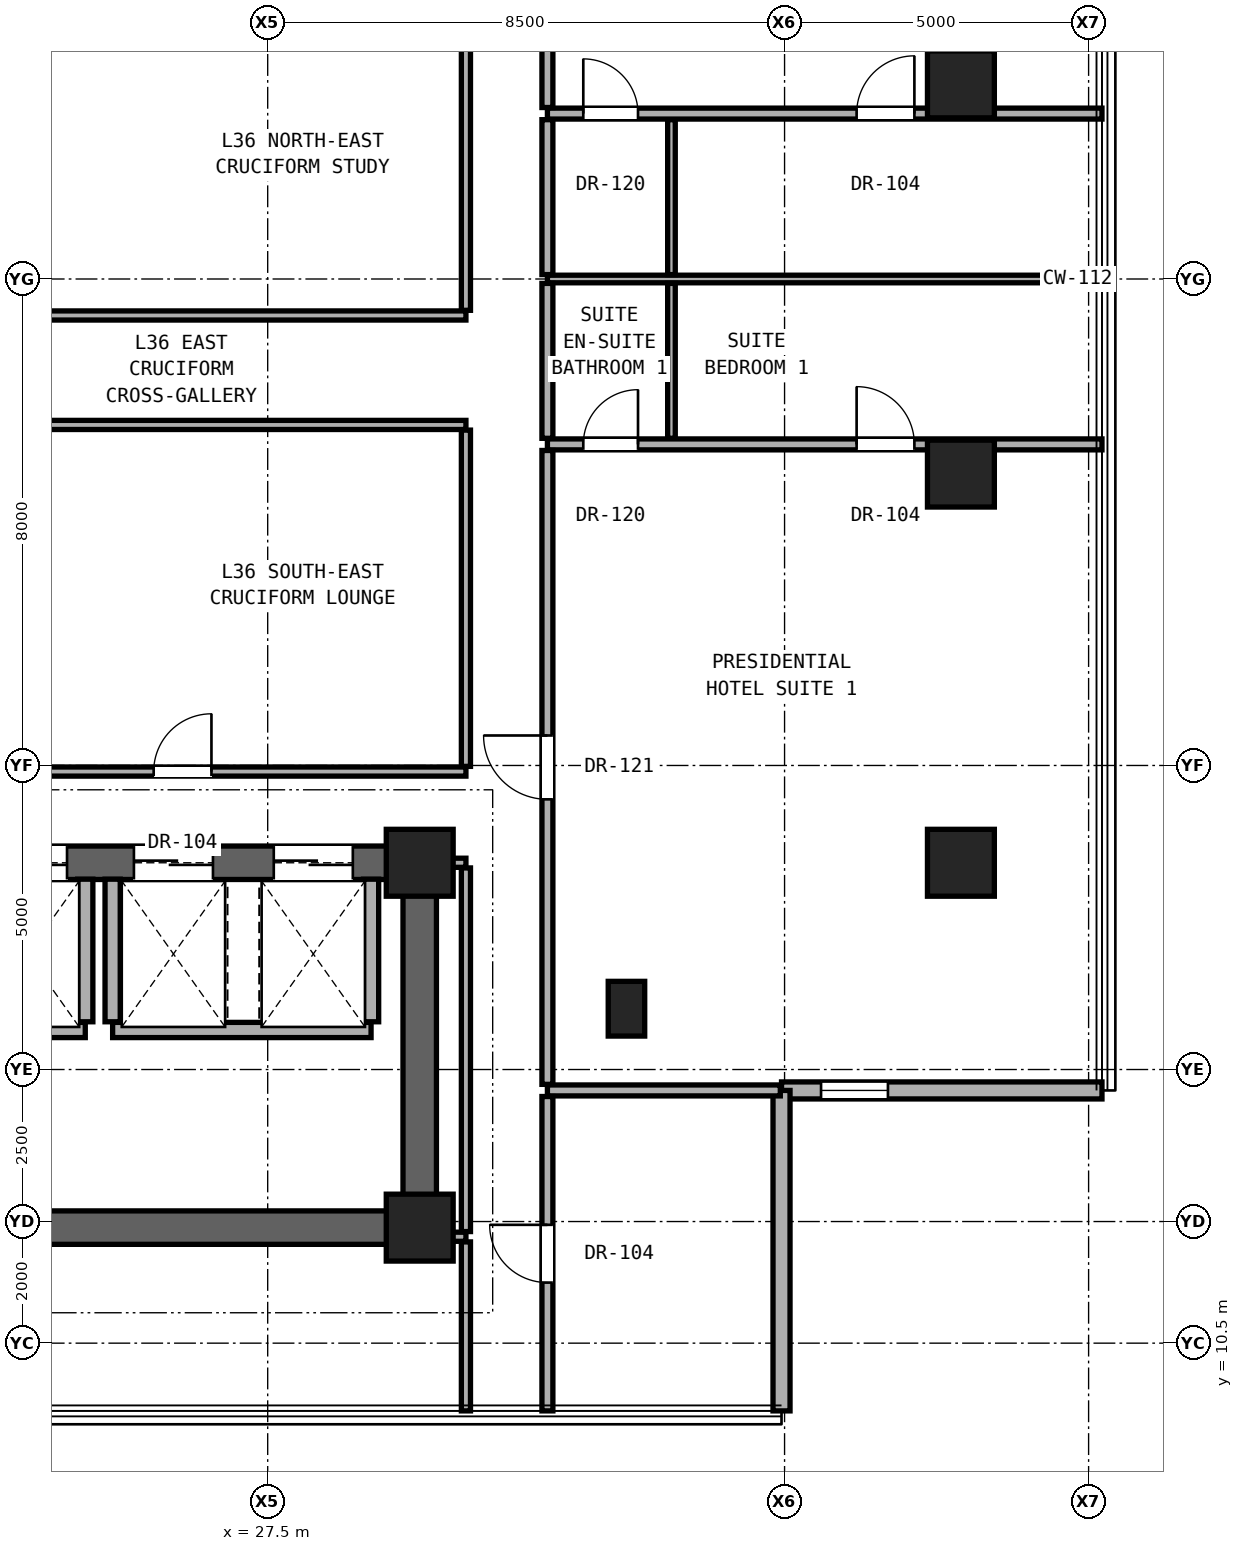
"""IFC4 building model, lengths in metres.
Left out: names, types, materials, properties, quantities, classifications, styles, units other than length and angle.
Written with IfcOpenShell. Run it as: python <this file> out.ifc"""

import sys

from ifc_helpers import new_model, si_unit, direction, frame, frame_2d, origin, origin_2d, place, context, subcontext, project, spatial, rectangle, hollow_rectangle, extrude, element, fill, save


model = new_model("IFC4")
c1 = context("Model", 3, precision=1e-05, world=origin(), true_north=direction((0.0, 1.0)))
c2 = subcontext(c1, "Body", "Model", "MODEL_VIEW")
j1 = project(units=[si_unit("LENGTHUNIT", "METRE"), si_unit("PLANEANGLEUNIT", "RADIAN")], contexts=[c1])
p1 = place(None, origin())
s1 = spatial("IfcSite", under=j1, at=p1, CompositionType="ELEMENT")
p2 = place(p1, origin())
s2 = spatial("IfcBuilding", under=s1, at=p2, CompositionType="ELEMENT")
p3 = place(p2, frame((0.0, 0.0, 128.0)))
s3 = spatial("IfcBuildingStorey", under=s2, at=p3, CompositionType="ELEMENT", Elevation=128.0)
for number, where, z_axis, x_axis in (
    (1, (30.0, 12.4, 0.0), (0.0, 0.0, 1.0), (1.0, 0.0, 0.0)),
    (2, (30.0, 18.4, 0.0), (0.0, 0.0, 1.0), (1.0, 0.0, 0.0)),
):
    element("IfcColumn", number, at=place(p3, frame(where, z_axis=z_axis, x_axis=x_axis)), inside=s3, PredefinedType="COLUMN", context=c2, shape_type="SweptSolid", body=[
        extrude(rectangle(XDim=1.1, YDim=1.1, at=origin_2d()), origin(), (0.0, 0.0, 1.0), 3.3),
    ])
for number, where, z_axis, x_axis in (
    (3, (38.9, 18.4, 0.0), (0.0, 0.0, 1.0), (1.0, 0.0, 0.0)),
    (4, (38.9, 24.8, 0.0), (0.0, 0.0, 1.0), (1.0, 0.0, 0.0)),
    (5, (38.9, 31.2, 0.0), (0.0, 0.0, 1.0), (1.0, 0.0, 0.0)),
):
    element("IfcColumn", number, at=place(p3, frame(where, z_axis=z_axis, x_axis=x_axis)), inside=s3, PredefinedType="COLUMN", context=c2, shape_type="SweptSolid", body=[
        extrude(hollow_rectangle(XDim=1.1, YDim=1.1, WallThickness=0.06, at=origin_2d()), origin(), (0.0, 0.0, 1.0), 3.3),
    ])
p4 = place(p3, frame((33.4, 16.0, 0.0), z_axis=(0.0, 0.0, 1.0), x_axis=(1.0, 0.0, 0.0)))
e6 = element("IfcColumn", 6, at=p4, inside=s3, PredefinedType="PILASTER", context=c2, shape_type="SweptSolid", body=[
    extrude(rectangle(XDim=0.6, YDim=0.9, at=origin_2d()), origin(), (0.0, 0.0, 1.0), 3.3),
])
p5 = place(p3, frame((11.0, 12.4, 0.0), z_axis=(0.0, 0.0, 1.0), x_axis=(1.0, 0.0, 0.0)))
e7 = element("IfcWall", 7, at=p5, inside=s3, PredefinedType="SHEAR", context=c2, shape_type="SweptSolid", body=[
    extrude(rectangle(XDim=19.0, YDim=0.55, at=frame_2d((9.5, 0.0))), origin(), (0.0, 0.0, 1.0), 3.08),
])
p6 = place(p3, frame((30.0, 12.4, 0.0), z_axis=(0.0, 0.0, 1.0), x_axis=(0.0, 1.0, 0.0)))
e8 = element("IfcWall", 8, at=p6, inside=s3, PredefinedType="SHEAR", context=c2, shape_type="SweptSolid", body=[
    extrude(rectangle(XDim=6.0, YDim=0.55, at=frame_2d((3.0, 0.0))), origin(), (0.0, 0.0, 1.0), 3.08),
])
p7 = place(p3, frame((11.0, 18.4, 0.0), z_axis=(0.0, 0.0, 1.0), x_axis=(1.0, 0.0, 0.0)))
e9 = element("IfcWall", 9, at=p7, inside=s3, PredefinedType="SHEAR", context=c2, shape_type="SweptSolid", body=[
    extrude(rectangle(XDim=19.0, YDim=0.55, at=frame_2d((9.5, 0.0))), origin(), (0.0, 0.0, 1.0), 3.08),
])
p8 = place(p7, frame((4.175, 0.0, 0.0)))
e10 = element("IfcOpeningElement", 10, at=p8, cuts=e9, PredefinedType="OPENING", context=c2, shape_type="SweptSolid", body=[
    extrude(rectangle(XDim=1.2, YDim=2.25, at=frame_2d((0.6, 1.125))), frame((0.0, 0.285, 0.0), z_axis=(0.0, -1.0, 0.0), x_axis=(1.0, 0.0, 0.0)), (0.0, 0.0, 1.0), 0.57),
])
p9 = place(p7, frame((9.6, 0.0, 0.0)))
e11 = element("IfcOpeningElement", 11, at=p9, cuts=e9, PredefinedType="OPENING", context=c2, shape_type="SweptSolid", body=[
    extrude(rectangle(XDim=1.3, YDim=2.3, at=frame_2d((0.65, 1.15))), frame((0.0, 0.285, 0.0), z_axis=(0.0, -1.0, 0.0), x_axis=(1.0, 0.0, 0.0)), (0.0, 0.0, 1.0), 0.57),
])
p10 = place(p7, frame((11.9, 0.0, 0.0)))
e12 = element("IfcOpeningElement", 12, at=p10, cuts=e9, PredefinedType="OPENING", context=c2, shape_type="SweptSolid", body=[
    extrude(rectangle(XDim=1.3, YDim=2.3, at=frame_2d((0.65, 1.15))), frame((0.0, 0.285, 0.0), z_axis=(0.0, -1.0, 0.0), x_axis=(1.0, 0.0, 0.0)), (0.0, 0.0, 1.0), 0.57),
])
p11 = place(p7, frame((14.3, 0.0, 0.0)))
e13 = element("IfcOpeningElement", 13, at=p11, cuts=e9, PredefinedType="OPENING", context=c2, shape_type="SweptSolid", body=[
    extrude(rectangle(XDim=1.3, YDim=2.3, at=frame_2d((0.65, 1.15))), frame((0.0, 0.285, 0.0), z_axis=(0.0, -1.0, 0.0), x_axis=(1.0, 0.0, 0.0)), (0.0, 0.0, 1.0), 0.57),
])
p12 = place(p7, frame((16.6, 0.0, 0.0)))
e14 = element("IfcOpeningElement", 14, at=p12, cuts=e9, PredefinedType="OPENING", context=c2, shape_type="SweptSolid", body=[
    extrude(rectangle(XDim=1.3, YDim=2.3, at=frame_2d((0.65, 1.15))), frame((0.0, 0.285, 0.0), z_axis=(0.0, -1.0, 0.0), x_axis=(1.0, 0.0, 0.0)), (0.0, 0.0, 1.0), 0.57),
])
p13 = place(p3, frame((35.95, 14.656, 0.0), z_axis=(0.0, 0.0, 1.0), x_axis=(1.0, 0.0, 0.0)))
e15 = element("IfcWall", 15, at=p13, inside=s3, PredefinedType="SOLIDWALL", context=c2, shape_type="SweptSolid", body=[
    extrude(rectangle(XDim=5.27, YDim=0.28, at=frame_2d((2.635, 0.0))), origin(), (0.0, 0.0, 1.0), 3.06),
])
p14 = place(p13, frame((0.65, 0.0, 0.85)))
e16 = element("IfcOpeningElement", 16, at=p14, cuts=e15, PredefinedType="OPENING", context=c2, shape_type="SweptSolid", body=[
    extrude(rectangle(XDim=1.1, YDim=2.0, at=frame_2d((0.55, 1.0))), frame((0.0, 0.15, 0.0), z_axis=(0.0, -1.0, 0.0), x_axis=(1.0, 0.0, 0.0)), (0.0, 0.0, 1.0), 0.3),
])
p15 = place(p3, frame((35.95, 9.386, 0.0), z_axis=(0.0, 0.0, 1.0), x_axis=(0.0, 1.0, 0.0)))
e17 = element("IfcWall", 17, at=p15, inside=s3, PredefinedType="SOLIDWALL", context=c2, shape_type="SweptSolid", body=[
    extrude(rectangle(XDim=5.27, YDim=0.28, at=frame_2d((2.635, 0.0))), origin(), (0.0, 0.0, 1.0), 3.06),
])
p16 = place(p3, frame((30.27, 12.25, 0.0), z_axis=(0.0, 0.0, 1.0), x_axis=(1.0, 0.0, 0.0)))
e18 = element("IfcWall", 18, at=p16, inside=s3, PredefinedType="PARTITIONING", context=c2, shape_type="SweptSolid", body=[
    extrude(rectangle(XDim=0.49, YDim=0.15, at=frame_2d((0.245, 0.0))), origin(), (0.0, 0.0, 1.0), 3.08),
])
p17 = place(p3, frame((32.1, 14.656, 0.0), z_axis=(0.0, 0.0, 1.0), x_axis=(1.0, 0.0, 0.0)))
e19 = element("IfcWall", 19, at=p17, inside=s3, PredefinedType="PARTITIONING", context=c2, shape_type="SweptSolid", body=[
    extrude(rectangle(XDim=3.83, YDim=0.18, at=frame_2d((1.915, 0.0))), origin(), (0.0, 0.0, 1.0), 3.08),
])
p18 = place(p3, frame((20.35, 15.65, 0.0), z_axis=(0.0, 0.0, 1.0), x_axis=(1.0, 0.0, 0.0)))
e20 = element("IfcWall", 20, at=p18, inside=s3, PredefinedType="SOLIDWALL", context=c2, shape_type="SweptSolid", body=[
    extrude(rectangle(XDim=4.15, YDim=0.25, at=frame_2d((2.075, 0.0))), origin(), (0.0, 0.0, 1.0), 3.08),
])
p19 = place(p3, frame((24.95, 15.65, 0.0), z_axis=(0.0, 0.0, 1.0), x_axis=(1.0, 0.0, 0.0)))
e21 = element("IfcWall", 21, at=p19, inside=s3, PredefinedType="SOLIDWALL", context=c2, shape_type="SweptSolid", body=[
    extrude(rectangle(XDim=4.25, YDim=0.25, at=frame_2d((2.125, 0.0))), origin(), (0.0, 0.0, 1.0), 3.08),
])
p20 = place(p3, frame((30.27, 18.4, 0.0), z_axis=(0.0, 0.0, 1.0), x_axis=(1.0, 0.0, 0.0)))
e22 = element("IfcWall", 22, at=p20, inside=s3, PredefinedType="PARTITIONING", context=c2, shape_type="SweptSolid", body=[
    extrude(rectangle(XDim=0.49, YDim=0.15, at=frame_2d((0.245, 0.0))), origin(), (0.0, 0.0, 1.0), 2.456),
])
p21 = place(p3, frame((21.44, 19.9, 0.0), z_axis=(0.0, 0.0, 1.0), x_axis=(1.0, 0.0, 0.0)))
e23 = element("IfcWall", 23, at=p21, inside=s3, PredefinedType="PARTITIONING", context=c2, shape_type="SweptSolid", body=[
    extrude(rectangle(XDim=9.32, YDim=0.15, at=frame_2d((4.66, 0.0))), origin(), (0.0, 0.0, 1.0), 2.216),
])
p22 = place(p21, frame((4.185, 0.0, 0.0)))
e24 = element("IfcOpeningElement", 24, at=p22, cuts=e23, PredefinedType="OPENING", context=c2, shape_type="SweptSolid", body=[
    extrude(rectangle(XDim=0.95, YDim=2.15, at=frame_2d((0.475, 1.075))), frame((0.0, 0.085, 0.0), z_axis=(0.0, -1.0, 0.0), x_axis=(1.0, 0.0, 0.0)), (0.0, 0.0, 1.0), 0.17),
])
p23 = place(p3, frame((32.1, 25.28, 0.0), z_axis=(0.0, 0.0, 1.0), x_axis=(1.0, 0.0, 0.0)))
e25 = element("IfcWall", 25, at=p23, inside=s3, PredefinedType="PARTITIONING", context=c2, shape_type="SweptSolid", body=[
    extrude(rectangle(XDim=9.12, YDim=0.18, at=frame_2d((4.56, 0.0))), origin(), (0.0, 0.0, 1.0), 2.299),
])
p24 = place(p23, frame((5.085, 0.0, 0.0)))
e26 = element("IfcOpeningElement", 26, at=p24, cuts=e25, PredefinedType="OPENING", context=c2, shape_type="SweptSolid", body=[
    extrude(rectangle(XDim=0.95, YDim=2.15, at=frame_2d((0.475, 1.075))), frame((0.0, 0.1, 0.0), z_axis=(0.0, -1.0, 0.0), x_axis=(1.0, 0.0, 0.0)), (0.0, 0.0, 1.0), 0.2),
])
p25 = place(p23, frame((0.59, 0.0, 0.0)))
e27 = element("IfcOpeningElement", 27, at=p25, cuts=e25, PredefinedType="OPENING", context=c2, shape_type="SweptSolid", body=[
    extrude(rectangle(XDim=0.9, YDim=2.1, at=frame_2d((0.45, 1.05))), frame((0.0, 0.1, 0.0), z_axis=(0.0, -1.0, 0.0), x_axis=(1.0, 0.0, 0.0)), (0.0, 0.0, 1.0), 0.2),
])
for number, where, z_axis, x_axis in (
    (28, (21.4, 25.6, 0.0), (0.0, 0.0, 1.0), (1.0, 0.0, 0.0)),
    (29, (21.4, 27.4, 0.0), (0.0, 0.0, 1.0), (1.0, 0.0, 0.0)),
):
    element("IfcWall", number, at=place(p3, frame(where, z_axis=z_axis, x_axis=x_axis)), inside=s3, PredefinedType="PARTITIONING", context=c2, shape_type="SweptSolid", body=[
        extrude(rectangle(XDim=9.36, YDim=0.15, at=frame_2d((4.68, 0.0))), origin(), (0.0, 0.0, 1.0), 2.216),
    ])
p26 = place(p3, frame((32.1, 28.0, 0.0), z_axis=(0.0, 0.0, 1.0), x_axis=(1.0, 0.0, 0.0)))
e30 = element("IfcWall", 30, at=p26, inside=s3, PredefinedType="PARTITIONING", context=c2, shape_type="SweptSolid", body=[
    extrude(rectangle(XDim=9.12, YDim=0.125, at=frame_2d((4.56, 0.0))), origin(), (0.0, 0.0, 1.0), 2.299),
])
p27 = place(p3, frame((32.1, 30.72, 0.0), z_axis=(0.0, 0.0, 1.0), x_axis=(1.0, 0.0, 0.0)))
e31 = element("IfcWall", 31, at=p27, inside=s3, PredefinedType="PARTITIONING", context=c2, shape_type="SweptSolid", body=[
    extrude(rectangle(XDim=9.12, YDim=0.18, at=frame_2d((4.56, 0.0))), origin(), (0.0, 0.0, 1.0), 2.299),
])
p28 = place(p27, frame((5.085, 0.0, 0.0)))
e32 = element("IfcOpeningElement", 32, at=p28, cuts=e31, PredefinedType="OPENING", context=c2, shape_type="SweptSolid", body=[
    extrude(rectangle(XDim=0.95, YDim=2.15, at=frame_2d((0.475, 1.075))), frame((0.0, 0.1, 0.0), z_axis=(0.0, -1.0, 0.0), x_axis=(1.0, 0.0, 0.0)), (0.0, 0.0, 1.0), 0.2),
])
p29 = place(p27, frame((0.59, 0.0, 0.0)))
e33 = element("IfcOpeningElement", 33, at=p29, cuts=e31, PredefinedType="OPENING", context=c2, shape_type="SweptSolid", body=[
    extrude(rectangle(XDim=0.9, YDim=2.1, at=frame_2d((0.45, 1.05))), frame((0.0, 0.1, 0.0), z_axis=(0.0, -1.0, 0.0), x_axis=(1.0, 0.0, 0.0)), (0.0, 0.0, 1.0), 0.2),
])
for number, where, z_axis, x_axis in (
    (34, (24.5, 15.785, 0.0), (0.0, 0.0, 1.0), (0.0, 1.0, 0.0)),
    (35, (24.95, 15.785, 0.0), (0.0, 0.0, 1.0), (0.0, 1.0, 0.0)),
    (36, (29.2, 15.785, 0.0), (0.0, 0.0, 1.0), (0.0, 1.0, 0.0)),
):
    element("IfcWall", number, at=place(p3, frame(where, z_axis=z_axis, x_axis=x_axis)), inside=s3, PredefinedType="SOLIDWALL", context=c2, shape_type="SweptSolid", body=[
        extrude(rectangle(XDim=2.345, YDim=0.25, at=frame_2d((1.172, 0.0))), origin(), (0.0, 0.0, 1.0), 3.08),
    ])
p30 = place(p3, frame((30.76, 9.386, 0.0), z_axis=(0.0, 0.0, 1.0), x_axis=(0.0, 1.0, 0.0)))
e37 = element("IfcWall", 37, at=p30, inside=s3, PredefinedType="PARTITIONING", context=c2, shape_type="SweptSolid", body=[
    extrude(rectangle(XDim=2.779, YDim=0.15, at=frame_2d((1.39, 0.0))), origin(), (0.0, 0.0, 1.0), 3.08),
])
p31 = place(p3, frame((30.76, 12.335, 0.0), z_axis=(0.0, 0.0, 1.0), x_axis=(0.0, 1.0, 0.0)))
e38 = element("IfcWall", 38, at=p31, inside=s3, PredefinedType="PARTITIONING", context=c2, shape_type="SweptSolid", body=[
    extrude(rectangle(XDim=5.98, YDim=0.15, at=frame_2d((2.99, 0.0))), origin(), (0.0, 0.0, 1.0), 2.456),
])
for number, where, z_axis, x_axis in (
    (39, (30.76, 19.985, 0.0), (0.0, 0.0, 1.0), (0.0, 1.0, 0.0)),
    (40, (30.76, 27.485, 0.0), (0.0, 0.0, 1.0), (0.0, 1.0, 0.0)),
):
    element("IfcWall", number, at=place(p3, frame(where, z_axis=z_axis, x_axis=x_axis)), inside=s3, PredefinedType="PARTITIONING", context=c2, shape_type="SweptSolid", body=[
        extrude(rectangle(XDim=5.53, YDim=0.15, at=frame_2d((2.765, 0.0))), origin(), (0.0, 0.0, 1.0), 2.299),
    ])
p32 = place(p3, frame((32.1, 9.386, 0.0), z_axis=(0.0, 0.0, 1.0), x_axis=(0.0, 1.0, 0.0)))
e41 = element("IfcWall", 41, at=p32, inside=s3, PredefinedType="PARTITIONING", context=c2, shape_type="SweptSolid", body=[
    extrude(rectangle(XDim=5.17, YDim=0.18, at=frame_2d((2.585, 0.0))), origin(), (0.0, 0.0, 1.0), 3.08),
])
p33 = place(p32, frame((2.11, 0.0, 0.0)))
e42 = element("IfcOpeningElement", 42, at=p33, cuts=e41, PredefinedType="OPENING", context=c2, shape_type="SweptSolid", body=[
    extrude(rectangle(XDim=0.95, YDim=2.15, at=frame_2d((0.475, 1.075))), frame((0.0, 0.1, 0.0), z_axis=(0.0, -1.0, 0.0), x_axis=(1.0, 0.0, 0.0)), (0.0, 0.0, 1.0), 0.2),
])
p34 = place(p3, frame((32.1, 14.756, 0.0), z_axis=(0.0, 0.0, 1.0), x_axis=(0.0, 1.0, 0.0)))
e43 = element("IfcWall", 43, at=p34, inside=s3, PredefinedType="PARTITIONING", context=c2, shape_type="SweptSolid", body=[
    extrude(rectangle(XDim=10.424, YDim=0.18, at=frame_2d((5.212, 0.0))), origin(), (0.0, 0.0, 1.0), 2.299),
])
p35 = place(p34, frame((4.687, 0.0, 0.0)))
e44 = element("IfcOpeningElement", 44, at=p35, cuts=e43, PredefinedType="OPENING", context=c2, shape_type="SweptSolid", body=[
    extrude(rectangle(XDim=1.05, YDim=2.2, at=frame_2d((0.525, 1.1))), frame((0.0, 0.1, 0.0), z_axis=(0.0, -1.0, 0.0), x_axis=(1.0, 0.0, 0.0)), (0.0, 0.0, 1.0), 0.2),
])
for number, where, z_axis, x_axis in (
    (45, (32.1, 25.38, 0.0), (0.0, 0.0, 1.0), (0.0, 1.0, 0.0)),
    (46, (32.1, 28.073, 0.0), (0.0, 0.0, 1.0), (0.0, 1.0, 0.0)),
):
    element("IfcWall", number, at=place(p3, frame(where, z_axis=z_axis, x_axis=x_axis)), inside=s3, PredefinedType="PARTITIONING", context=c2, shape_type="SweptSolid", body=[
        extrude(rectangle(XDim=2.548, YDim=0.18, at=frame_2d((1.274, 0.0))), origin(), (0.0, 0.0, 1.0), 3.08),
    ])
p36 = place(p3, frame((32.1, 30.82, 0.0), z_axis=(0.0, 0.0, 1.0), x_axis=(0.0, 1.0, 0.0)))
e47 = element("IfcWall", 47, at=p36, inside=s3, PredefinedType="PARTITIONING", context=c2, shape_type="SweptSolid", body=[
    extrude(rectangle(XDim=10.424, YDim=0.18, at=frame_2d((5.212, 0.0))), origin(), (0.0, 0.0, 1.0), 2.299),
])
p37 = place(p36, frame((4.687, 0.0, 0.0)))
e48 = element("IfcOpeningElement", 48, at=p37, cuts=e47, PredefinedType="OPENING", context=c2, shape_type="SweptSolid", body=[
    extrude(rectangle(XDim=1.05, YDim=2.2, at=frame_2d((0.525, 1.1))), frame((0.0, 0.1, 0.0), z_axis=(0.0, -1.0, 0.0), x_axis=(1.0, 0.0, 0.0)), (0.0, 0.0, 1.0), 0.2),
])
for number, where, z_axis, x_axis in (
    (49, (34.14, 25.38, 0.0), (0.0, 0.0, 1.0), (0.0, 1.0, 0.0)),
    (50, (34.14, 28.073, 0.0), (0.0, 0.0, 1.0), (0.0, 1.0, 0.0)),
):
    element("IfcWall", number, at=place(p3, frame(where, z_axis=z_axis, x_axis=x_axis)), inside=s3, PredefinedType="PARTITIONING", context=c2, shape_type="SweptSolid", body=[
        extrude(rectangle(XDim=2.548, YDim=0.125, at=frame_2d((1.274, 0.0))), origin(), (0.0, 0.0, 1.0), 3.08),
    ])
p38 = place(p14, origin())
e51 = element("IfcWindow", 51, at=p38, inside=s3, PartitioningType="SINGLE_PANEL", PredefinedType="WINDOW", context=c2, shape_type="SweptSolid", body=[
    extrude(rectangle(XDim=1.1, YDim=2.0, at=frame_2d((0.55, 1.0))), frame((0.0, 0.03, 0.0), z_axis=(0.0, -1.0, 0.0), x_axis=(1.0, 0.0, 0.0)), (0.0, 0.0, 1.0), 0.06),
])
fill(e16, e51)
p39 = place(p35, origin())
e52 = element("IfcDoor", 52, at=p39, inside=s3, OperationType="SINGLE_SWING_RIGHT", PredefinedType="DOOR", context=c2, shape_type="SweptSolid", body=[
    extrude(rectangle(XDim=1.05, YDim=2.2, at=frame_2d((0.525, 1.1))), frame((0.0, 0.025, 0.0), z_axis=(0.0, -1.0, 0.0), x_axis=(1.0, 0.0, 0.0)), (0.0, 0.0, 1.0), 0.05),
])
fill(e44, e52)
p40 = place(p24, origin())
e53 = element("IfcDoor", 53, at=p40, inside=s3, OperationType="SINGLE_SWING_LEFT", PredefinedType="DOOR", context=c2, shape_type="SweptSolid", body=[
    extrude(rectangle(XDim=0.95, YDim=2.15, at=frame_2d((0.475, 1.075))), frame((0.0, 0.025, 0.0), z_axis=(0.0, -1.0, 0.0), x_axis=(1.0, 0.0, 0.0)), (0.0, 0.0, 1.0), 0.05),
])
fill(e26, e53)
p41 = place(p25, origin())
e54 = element("IfcDoor", 54, at=p41, inside=s3, OperationType="SINGLE_SWING_RIGHT", PredefinedType="DOOR", context=c2, shape_type="SweptSolid", body=[
    extrude(rectangle(XDim=0.9, YDim=2.1, at=frame_2d((0.45, 1.05))), frame((0.0, 0.025, 0.0), z_axis=(0.0, -1.0, 0.0), x_axis=(1.0, 0.0, 0.0)), (0.0, 0.0, 1.0), 0.05),
])
fill(e27, e54)
p42 = place(p28, origin())
e55 = element("IfcDoor", 55, at=p42, inside=s3, OperationType="SINGLE_SWING_RIGHT", PredefinedType="DOOR", context=c2, shape_type="SweptSolid", body=[
    extrude(rectangle(XDim=0.95, YDim=2.15, at=frame_2d((0.475, 1.075))), frame((0.0, 0.025, 0.0), z_axis=(0.0, -1.0, 0.0), x_axis=(1.0, 0.0, 0.0)), (0.0, 0.0, 1.0), 0.05),
])
fill(e32, e55)
p43 = place(p29, origin())
e56 = element("IfcDoor", 56, at=p43, inside=s3, OperationType="SINGLE_SWING_LEFT", PredefinedType="DOOR", context=c2, shape_type="SweptSolid", body=[
    extrude(rectangle(XDim=0.9, YDim=2.1, at=frame_2d((0.45, 1.05))), frame((0.0, 0.025, 0.0), z_axis=(0.0, -1.0, 0.0), x_axis=(1.0, 0.0, 0.0)), (0.0, 0.0, 1.0), 0.05),
])
fill(e33, e56)
p44 = place(p22, origin())
e57 = element("IfcDoor", 57, at=p44, inside=s3, OperationType="SINGLE_SWING_RIGHT", PredefinedType="DOOR", context=c2, shape_type="SweptSolid", body=[
    extrude(rectangle(XDim=0.95, YDim=2.15, at=frame_2d((0.475, 1.075))), frame((0.0, 0.025, 0.0), z_axis=(0.0, -1.0, 0.0), x_axis=(1.0, 0.0, 0.0)), (0.0, 0.0, 1.0), 0.05),
])
fill(e24, e57)
p45 = place(p33, origin())
e58 = element("IfcDoor", 58, at=p45, inside=s3, OperationType="SINGLE_SWING_RIGHT", PredefinedType="DOOR", context=c2, shape_type="SweptSolid", body=[
    extrude(rectangle(XDim=0.95, YDim=2.15, at=frame_2d((0.475, 1.075))), frame((0.0, 0.025, 0.0), z_axis=(0.0, -1.0, 0.0), x_axis=(1.0, 0.0, 0.0)), (0.0, 0.0, 1.0), 0.05),
])
fill(e42, e58)
p46 = place(p10, origin())
e59 = element("IfcDoor", 59, at=p46, inside=s3, OperationType="DOUBLE_DOOR_SLIDING", PredefinedType="DOOR", context=c2, shape_type="SweptSolid", body=[
    extrude(rectangle(XDim=1.3, YDim=2.3, at=frame_2d((0.65, 1.15))), frame((0.0, 0.025, 0.0), z_axis=(0.0, -1.0, 0.0), x_axis=(1.0, 0.0, 0.0)), (0.0, 0.0, 1.0), 0.05),
])
fill(e12, e59)
p47 = place(p11, origin())
e60 = element("IfcDoor", 60, at=p47, inside=s3, OperationType="DOUBLE_DOOR_SLIDING", PredefinedType="DOOR", context=c2, shape_type="SweptSolid", body=[
    extrude(rectangle(XDim=1.3, YDim=2.3, at=frame_2d((0.65, 1.15))), frame((0.0, 0.025, 0.0), z_axis=(0.0, -1.0, 0.0), x_axis=(1.0, 0.0, 0.0)), (0.0, 0.0, 1.0), 0.05),
])
fill(e13, e60)
p48 = place(p12, origin())
e61 = element("IfcDoor", 61, at=p48, inside=s3, OperationType="DOUBLE_DOOR_SLIDING", PredefinedType="DOOR", context=c2, shape_type="SweptSolid", body=[
    extrude(rectangle(XDim=1.3, YDim=2.3, at=frame_2d((0.65, 1.15))), frame((0.0, 0.025, 0.0), z_axis=(0.0, -1.0, 0.0), x_axis=(1.0, 0.0, 0.0)), (0.0, 0.0, 1.0), 0.05),
])
fill(e14, e61)
save(model, sys.argv[1])
